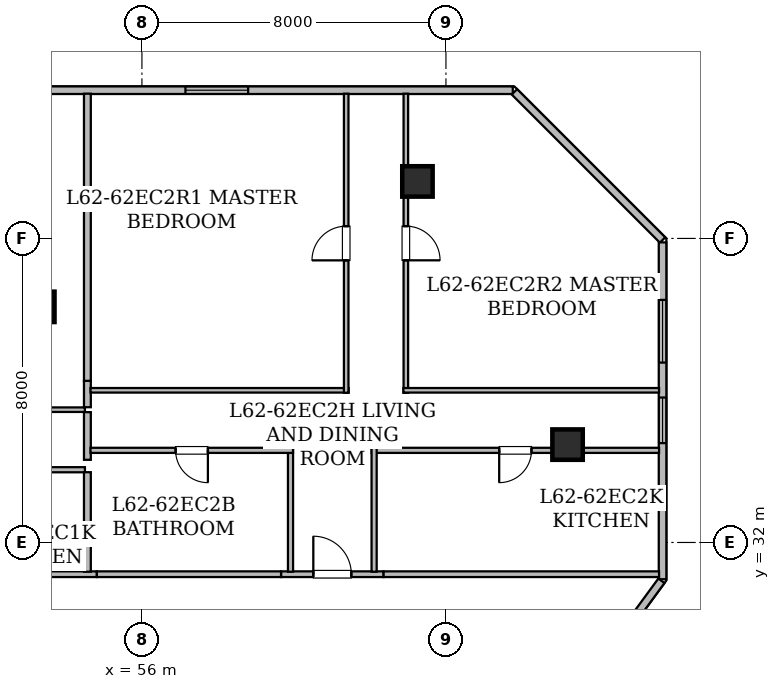
"""IFC4 building model, lengths in metres.
Left out: names, types, materials, properties, quantities, classifications, styles, units other than length and angle.
Written with IfcOpenShell. Run it as: python <this file> out.ifc"""

import sys

from ifc_helpers import new_model, si_unit, direction, frame, frame_2d, origin, origin_2d, place, context, subcontext, project, spatial, rectangle, hollow_rectangle, extrude, element, fill, save


model = new_model("IFC4")
c1 = context("Model", 3, precision=1e-05, world=origin(), true_north=direction((0.0, 1.0)))
c2 = subcontext(c1, "Body", "Model", "MODEL_VIEW")
j1 = project(units=[si_unit("LENGTHUNIT", "METRE"), si_unit("PLANEANGLEUNIT", "RADIAN")], contexts=[c1])
p1 = place(None, origin())
s1 = spatial("IfcSite", under=j1, at=p1, CompositionType="ELEMENT")
p2 = place(p1, origin())
s2 = spatial("IfcBuilding", under=s1, at=p2, CompositionType="ELEMENT")
p3 = place(p2, frame((0.0, 0.0, 242.75)))
s3 = spatial("IfcBuildingStorey", under=s2, at=p3, CompositionType="ELEMENT", Elevation=242.75)
for number, where, z_axis, x_axis in (
    (1, (63.25, 41.5, 0.0), (0.0, 0.0, 1.0), (1.0, 0.0, 0.0)),
    (2, (67.2, 34.575, 0.0), (0.0, 0.0, 1.0), (1.0, 0.0, 0.0)),
    (3, (53.3, 38.2, 0.0), (0.0, 0.0, 1.0), (1.0, 0.0, 0.0)),
):
    element("IfcColumn", number, at=place(p3, frame(where, z_axis=z_axis, x_axis=x_axis)), inside=s3, PredefinedType="COLUMN", context=c2, shape_type="SweptSolid", body=[
        extrude(hollow_rectangle(XDim=0.8, YDim=0.8, WallThickness=0.04, at=origin_2d()), origin(), (0.0, 0.0, 1.0), 3.65),
    ])
p4 = place(p3, frame((24.302, 43.9, 0.0), z_axis=(0.0, 0.0, 1.0), x_axis=(1.0, 0.0, 0.0)))
e4 = element("IfcWall", 4, at=p4, inside=s3, PredefinedType="STANDARD", context=c2, shape_type="SweptSolid", body=[
    extrude(rectangle(XDim=41.457, YDim=0.2, at=frame_2d((20.729, 0.0))), origin(), (0.0, 0.0, 1.0), 3.43),
])
p5 = place(p4, frame((5.573, 0.0, 0.85)))
e5 = element("IfcOpeningElement", 5, at=p5, cuts=e4, PredefinedType="OPENING", context=c2, shape_type="SweptSolid", body=[
    extrude(rectangle(XDim=1.65, YDim=1.55, at=frame_2d((0.825, 0.775))), frame((0.0, 0.11, 0.0), z_axis=(0.0, -1.0, 0.0), x_axis=(1.0, 0.0, 0.0)), (0.0, 0.0, 1.0), 0.22),
])
p6 = place(p4, frame((0.604, 0.0, 0.85)))
e6 = element("IfcOpeningElement", 6, at=p6, cuts=e4, PredefinedType="OPENING", context=c2, shape_type="SweptSolid", body=[
    extrude(rectangle(XDim=1.65, YDim=1.55, at=frame_2d((0.825, 0.775))), frame((0.0, 0.11, 0.0), z_axis=(0.0, -1.0, 0.0), x_axis=(1.0, 0.0, 0.0)), (0.0, 0.0, 1.0), 0.22),
])
p7 = place(p4, frame((23.188, 0.0, 0.8)))
e7 = element("IfcOpeningElement", 7, at=p7, cuts=e4, PredefinedType="OPENING", context=c2, shape_type="SweptSolid", body=[
    extrude(rectangle(XDim=1.2, YDim=1.5, at=frame_2d((0.6, 0.75))), frame((0.0, 0.11, 0.0), z_axis=(0.0, -1.0, 0.0), x_axis=(1.0, 0.0, 0.0)), (0.0, 0.0, 1.0), 0.22),
])
p8 = place(p4, frame((19.333, 0.0, 0.85)))
e8 = element("IfcOpeningElement", 8, at=p8, cuts=e4, PredefinedType="OPENING", context=c2, shape_type="SweptSolid", body=[
    extrude(rectangle(XDim=1.65, YDim=1.55, at=frame_2d((0.825, 0.775))), frame((0.0, 0.11, 0.0), z_axis=(0.0, -1.0, 0.0), x_axis=(1.0, 0.0, 0.0)), (0.0, 0.0, 1.0), 0.22),
])
p9 = place(p4, frame((26.593, 0.0, 0.85)))
e9 = element("IfcOpeningElement", 9, at=p9, cuts=e4, PredefinedType="OPENING", context=c2, shape_type="SweptSolid", body=[
    extrude(rectangle(XDim=1.65, YDim=1.55, at=frame_2d((0.825, 0.775))), frame((0.0, 0.11, 0.0), z_axis=(0.0, -1.0, 0.0), x_axis=(1.0, 0.0, 0.0)), (0.0, 0.0, 1.0), 0.22),
])
p10 = place(p4, frame((32.843, 0.0, 0.85)))
e10 = element("IfcOpeningElement", 10, at=p10, cuts=e4, PredefinedType="OPENING", context=c2, shape_type="SweptSolid", body=[
    extrude(rectangle(XDim=1.65, YDim=1.55, at=frame_2d((0.825, 0.775))), frame((0.0, 0.11, 0.0), z_axis=(0.0, -1.0, 0.0), x_axis=(1.0, 0.0, 0.0)), (0.0, 0.0, 1.0), 0.22),
])
p11 = place(p3, frame((65.802, 43.857, 0.0), z_axis=(0.0, 0.0, 1.0), x_axis=(0.707106781187, -0.707106781187, 0.0)))
e11 = element("IfcWall", 11, at=p11, inside=s3, PredefinedType="STANDARD", context=c2, shape_type="SweptSolid", body=[
    extrude(rectangle(XDim=5.512, YDim=0.2, at=frame_2d((2.756, 0.0))), origin(), (0.0, 0.0, 1.0), 3.43),
])
p12 = place(p3, frame((69.7, 39.896, 0.0), z_axis=(0.0, 0.0, 1.0), x_axis=(0.0, -1.0, 0.0)))
e12 = element("IfcWall", 12, at=p12, inside=s3, PredefinedType="STANDARD", context=c2, shape_type="SweptSolid", body=[
    extrude(rectangle(XDim=8.863, YDim=0.2, at=frame_2d((4.432, 0.0))), origin(), (0.0, 0.0, 1.0), 3.43),
])
p13 = place(p12, frame((4.082, 0.0, 0.8)))
e13 = element("IfcOpeningElement", 13, at=p13, cuts=e12, PredefinedType="OPENING", context=c2, shape_type="SweptSolid", body=[
    extrude(rectangle(XDim=1.2, YDim=1.5, at=frame_2d((0.6, 0.75))), frame((0.0, 0.11, 0.0), z_axis=(0.0, -1.0, 0.0), x_axis=(1.0, 0.0, 0.0)), (0.0, 0.0, 1.0), 0.22),
])
p14 = place(p12, frame((1.513, 0.0, 0.85)))
e14 = element("IfcOpeningElement", 14, at=p14, cuts=e12, PredefinedType="OPENING", context=c2, shape_type="SweptSolid", body=[
    extrude(rectangle(XDim=1.65, YDim=1.55, at=frame_2d((0.825, 0.775))), frame((0.0, 0.11, 0.0), z_axis=(0.0, -1.0, 0.0), x_axis=(1.0, 0.0, 0.0)), (0.0, 0.0, 1.0), 0.22),
])
p15 = place(p3, frame((69.67, 30.992, 0.0), z_axis=(0.0, 0.0, 1.0), x_axis=(-0.591320870733, -0.806436375566, 0.0)))
e15 = element("IfcWall", 15, at=p15, inside=s3, PredefinedType="STANDARD", context=c2, shape_type="SweptSolid", body=[
    extrude(rectangle(XDim=3.71, YDim=0.2, at=frame_2d((1.855, 0.0))), origin(), (0.0, 0.0, 1.0), 3.43),
])
p16 = place(p3, frame((49.439, 31.165, 0.0), z_axis=(0.0, 0.0, 1.0), x_axis=(1.0, 0.0, 0.0)))
e16 = element("IfcWall", 16, at=p16, inside=s3, PredefinedType="STANDARD", context=c2, shape_type="SweptSolid", body=[
    extrude(rectangle(XDim=5.375, YDim=0.15, at=frame_2d((2.688, 0.0))), origin(), (0.0, 0.0, 1.0), 2.725),
])
p17 = place(p3, frame((59.661, 31.165, 0.0), z_axis=(0.0, 0.0, 1.0), x_axis=(1.0, 0.0, 0.0)))
e17 = element("IfcWall", 17, at=p17, inside=s3, PredefinedType="STANDARD", context=c2, shape_type="SweptSolid", body=[
    extrude(rectangle(XDim=2.698, YDim=0.15, at=frame_2d((1.349, 0.0))), origin(), (0.0, 0.0, 1.0), 3.43),
])
p18 = place(p17, frame((0.849, 0.0, 0.0)))
e18 = element("IfcOpeningElement", 18, at=p18, cuts=e17, PredefinedType="OPENING", context=c2, shape_type="SweptSolid", body=[
    extrude(rectangle(XDim=1.0, YDim=2.15, at=frame_2d((0.5, 1.075))), frame((0.0, 0.085, 0.0), z_axis=(0.0, -1.0, 0.0), x_axis=(1.0, 0.0, 0.0)), (0.0, 0.0, 1.0), 0.17),
])
p19 = place(p3, frame((54.814, 31.165, 0.0), z_axis=(0.0, 0.0, 1.0), x_axis=(1.0, 0.0, 0.0)))
e19 = element("IfcWall", 19, at=p19, inside=s3, PredefinedType="STANDARD", context=c2, shape_type="SweptSolid", body=[
    extrude(rectangle(XDim=4.847, YDim=0.15, at=frame_2d((2.423, 0.0))), origin(), (0.0, 0.0, 1.0), 3.43),
])
p20 = place(p3, frame((62.359, 31.165, 0.0), z_axis=(0.0, 0.0, 1.0), x_axis=(1.0, 0.0, 0.0)))
e20 = element("IfcWall", 20, at=p20, inside=s3, PredefinedType="STANDARD", context=c2, shape_type="SweptSolid", body=[
    extrude(rectangle(XDim=7.249, YDim=0.15, at=frame_2d((3.625, 0.0))), origin(), (0.0, 0.0, 1.0), 2.887),
])
p21 = place(p3, frame((54.5, 33.914, 0.0), z_axis=(0.0, 0.0, 1.0), x_axis=(-1.0, 0.0, 0.0)))
e21 = element("IfcWall", 21, at=p21, inside=s3, PredefinedType="PARTITIONING", context=c2, shape_type="SweptSolid", body=[
    extrude(rectangle(XDim=5.375, YDim=0.135, at=frame_2d((2.688, 0.0))), origin(), (0.0, 0.0, 1.0), 2.725),
])
p22 = place(p21, frame((2.263, 0.0, 0.0)))
e22 = element("IfcOpeningElement", 22, at=p22, cuts=e21, PredefinedType="OPENING", context=c2, shape_type="SweptSolid", body=[
    extrude(rectangle(XDim=0.85, YDim=2.1, at=frame_2d((0.425, 1.05))), frame((0.0, 0.077, 0.0), z_axis=(0.0, -1.0, 0.0), x_axis=(1.0, 0.0, 0.0)), (0.0, 0.0, 1.0), 0.155),
])
p23 = place(p3, frame((48.81, 35.494, 0.0), z_axis=(0.0, 0.0, 1.0), x_axis=(1.0, 0.0, 0.0)))
e23 = element("IfcWall", 23, at=p23, inside=s3, PredefinedType="PARTITIONING", context=c2, shape_type="SweptSolid", body=[
    extrude(rectangle(XDim=5.69, YDim=0.12, at=frame_2d((2.845, 0.0))), origin(), (0.0, 0.0, 1.0), 2.725),
])
p24 = place(p3, frame((54.565, 35.429, 0.0), z_axis=(0.0, 0.0, 1.0), x_axis=(0.0, -1.0, 0.0)))
e24 = element("IfcWall", 24, at=p24, inside=s3, PredefinedType="STANDARD", context=c2, shape_type="SweptSolid", body=[
    extrude(rectangle(XDim=1.254, YDim=0.18, at=frame_2d((0.627, 0.0))), origin(), (0.0, 0.0, 1.0), 3.43),
])
p25 = place(p3, frame((54.565, 33.849, 0.0), z_axis=(0.0, 0.0, 1.0), x_axis=(0.0, -1.0, 0.0)))
e25 = element("IfcWall", 25, at=p25, inside=s3, PredefinedType="STANDARD", context=c2, shape_type="SweptSolid", body=[
    extrude(rectangle(XDim=2.619, YDim=0.18, at=frame_2d((1.31, 0.0))), origin(), (0.0, 0.0, 1.0), 3.107),
])
p26 = place(p3, frame((54.565, 36.253, 0.0), z_axis=(0.0, 0.0, 1.0), x_axis=(0.0, -1.0, 0.0)))
e26 = element("IfcWall", 26, at=p26, inside=s3, PredefinedType="STANDARD", context=c2, shape_type="SweptSolid", body=[
    extrude(rectangle(XDim=0.694, YDim=0.18, at=frame_2d((0.347, 0.0))), origin(), (0.0, 0.0, 1.0), 3.43),
])
p27 = place(p3, frame((54.565, 43.808, 0.0), z_axis=(0.0, 0.0, 1.0), x_axis=(0.0, -1.0, 0.0)))
e27 = element("IfcWall", 27, at=p27, inside=s3, PredefinedType="STANDARD", context=c2, shape_type="SweptSolid", body=[
    extrude(rectangle(XDim=7.555, YDim=0.18, at=frame_2d((3.778, 0.0))), origin(), (0.0, 0.0, 1.0), 2.725),
])
p28 = place(p3, frame((59.91, 31.23, 0.0), z_axis=(0.0, 0.0, 1.0), x_axis=(0.0, 1.0, 0.0)))
e28 = element("IfcWall", 28, at=p28, inside=s3, PredefinedType="PARTITIONING", context=c2, shape_type="SweptSolid", body=[
    extrude(rectangle(XDim=3.259, YDim=0.135, at=frame_2d((1.629, 0.0))), origin(), (0.0, 0.0, 1.0), 3.107),
])
p29 = place(p3, frame((59.975, 34.424, 0.0), z_axis=(0.0, 0.0, 1.0), x_axis=(-1.0, 0.0, 0.0)))
e29 = element("IfcWall", 29, at=p29, inside=s3, PredefinedType="PARTITIONING", context=c2, shape_type="SweptSolid", body=[
    extrude(rectangle(XDim=5.328, YDim=0.135, at=frame_2d((2.664, 0.0))), origin(), (0.0, 0.0, 1.0), 3.43),
])
p30 = place(p29, frame((2.239, 0.0, 0.0)))
e30 = element("IfcOpeningElement", 30, at=p30, cuts=e29, PredefinedType="OPENING", context=c2, shape_type="SweptSolid", body=[
    extrude(rectangle(XDim=0.85, YDim=2.1, at=frame_2d((0.425, 1.05))), frame((0.0, 0.077, 0.0), z_axis=(0.0, -1.0, 0.0), x_axis=(1.0, 0.0, 0.0)), (0.0, 0.0, 1.0), 0.155),
])
p31 = place(p3, frame((69.608, 34.424, 0.0), z_axis=(0.0, 0.0, 1.0), x_axis=(-1.0, 0.0, 0.0)))
e31 = element("IfcWall", 31, at=p31, inside=s3, PredefinedType="PARTITIONING", context=c2, shape_type="SweptSolid", body=[
    extrude(rectangle(XDim=7.563, YDim=0.135, at=frame_2d((3.781, 0.0))), origin(), (0.0, 0.0, 1.0), 2.725),
])
p32 = place(p31, frame((3.357, 0.0, 0.0)))
e32 = element("IfcOpeningElement", 32, at=p32, cuts=e31, PredefinedType="OPENING", context=c2, shape_type="SweptSolid", body=[
    extrude(rectangle(XDim=0.85, YDim=2.1, at=frame_2d((0.425, 1.05))), frame((0.0, 0.077, 0.0), z_axis=(0.0, -1.0, 0.0), x_axis=(1.0, 0.0, 0.0)), (0.0, 0.0, 1.0), 0.155),
])
p33 = place(p3, frame((62.11, 34.489, 0.0), z_axis=(0.0, 0.0, 1.0), x_axis=(0.0, -1.0, 0.0)))
e33 = element("IfcWall", 33, at=p33, inside=s3, PredefinedType="PARTITIONING", context=c2, shape_type="SweptSolid", body=[
    extrude(rectangle(XDim=3.259, YDim=0.135, at=frame_2d((1.629, 0.0))), origin(), (0.0, 0.0, 1.0), 3.107),
])
p34 = place(p3, frame((54.647, 36.004, 0.0), z_axis=(0.0, 0.0, 1.0), x_axis=(1.0, 0.0, 0.0)))
e34 = element("IfcWall", 34, at=p34, inside=s3, PredefinedType="PARTITIONING", context=c2, shape_type="SweptSolid", body=[
    extrude(rectangle(XDim=6.793, YDim=0.12, at=frame_2d((3.396, 0.0))), origin(), (0.0, 0.0, 1.0), 2.725),
])
p35 = place(p3, frame((61.375, 35.939, 0.0), z_axis=(0.0, 0.0, 1.0), x_axis=(0.0, 1.0, 0.0)))
e35 = element("IfcWall", 35, at=p35, inside=s3, PredefinedType="PARTITIONING", context=c2, shape_type="SweptSolid", body=[
    extrude(rectangle(XDim=7.869, YDim=0.12, at=frame_2d((3.935, 0.0))), origin(), (0.0, 0.0, 1.0), 2.725),
])
p36 = place(p35, frame((3.484, 0.0, 0.0)))
e36 = element("IfcOpeningElement", 36, at=p36, cuts=e35, PredefinedType="OPENING", context=c2, shape_type="SweptSolid", body=[
    extrude(rectangle(XDim=0.9, YDim=2.1, at=frame_2d((0.45, 1.05))), frame((0.0, 0.07, 0.0), z_axis=(0.0, -1.0, 0.0), x_axis=(1.0, 0.0, 0.0)), (0.0, 0.0, 1.0), 0.14),
])
p37 = place(p3, frame((62.945, 43.808, 0.0), z_axis=(0.0, 0.0, 1.0), x_axis=(0.0, -1.0, 0.0)))
e37 = element("IfcWall", 37, at=p37, inside=s3, PredefinedType="PARTITIONING", context=c2, shape_type="SweptSolid", body=[
    extrude(rectangle(XDim=7.869, YDim=0.12, at=frame_2d((3.935, 0.0))), origin(), (0.0, 0.0, 1.0), 2.725),
])
p38 = place(p37, frame((3.484, 0.0, 0.0)))
e38 = element("IfcOpeningElement", 38, at=p38, cuts=e37, PredefinedType="OPENING", context=c2, shape_type="SweptSolid", body=[
    extrude(rectangle(XDim=0.9, YDim=2.1, at=frame_2d((0.45, 1.05))), frame((0.0, 0.07, 0.0), z_axis=(0.0, -1.0, 0.0), x_axis=(1.0, 0.0, 0.0)), (0.0, 0.0, 1.0), 0.14),
])
p39 = place(p3, frame((62.88, 36.004, 0.0), z_axis=(0.0, 0.0, 1.0), x_axis=(1.0, 0.0, 0.0)))
e39 = element("IfcWall", 39, at=p39, inside=s3, PredefinedType="PARTITIONING", context=c2, shape_type="SweptSolid", body=[
    extrude(rectangle(XDim=6.728, YDim=0.12, at=frame_2d((3.364, 0.0))), origin(), (0.0, 0.0, 1.0), 2.725),
])
p40 = place(p13, origin())
e40 = element("IfcWindow", 40, at=p40, inside=s3, PartitioningType="SINGLE_PANEL", PredefinedType="WINDOW", context=c2, shape_type="SweptSolid", body=[
    extrude(rectangle(XDim=1.2, YDim=1.5, at=frame_2d((0.6, 0.75))), frame((0.0, 0.03, 0.0), z_axis=(0.0, -1.0, 0.0), x_axis=(1.0, 0.0, 0.0)), (0.0, 0.0, 1.0), 0.06),
])
fill(e13, e40)
p41 = place(p10, origin())
e41 = element("IfcWindow", 41, at=p41, inside=s3, PartitioningType="SINGLE_PANEL", PredefinedType="WINDOW", context=c2, shape_type="SweptSolid", body=[
    extrude(rectangle(XDim=1.65, YDim=1.55, at=frame_2d((0.825, 0.775))), frame((0.0, 0.03, 0.0), z_axis=(0.0, -1.0, 0.0), x_axis=(1.0, 0.0, 0.0)), (0.0, 0.0, 1.0), 0.06),
])
fill(e10, e41)
p42 = place(p14, origin())
e42 = element("IfcWindow", 42, at=p42, inside=s3, PartitioningType="SINGLE_PANEL", PredefinedType="WINDOW", context=c2, shape_type="SweptSolid", body=[
    extrude(rectangle(XDim=1.65, YDim=1.55, at=frame_2d((0.825, 0.775))), frame((0.0, 0.03, 0.0), z_axis=(0.0, -1.0, 0.0), x_axis=(1.0, 0.0, 0.0)), (0.0, 0.0, 1.0), 0.06),
])
fill(e14, e42)
p43 = place(p18, origin())
e43 = element("IfcDoor", 43, at=p43, inside=s3, OperationType="SINGLE_SWING_LEFT", PredefinedType="DOOR", context=c2, shape_type="SweptSolid", body=[
    extrude(rectangle(XDim=1.0, YDim=2.15, at=frame_2d((0.5, 1.075))), frame((0.0, 0.025, 0.0), z_axis=(0.0, -1.0, 0.0), x_axis=(1.0, 0.0, 0.0)), (0.0, 0.0, 1.0), 0.05),
])
fill(e18, e43)
p44 = place(p30, origin())
e44 = element("IfcDoor", 44, at=p44, inside=s3, OperationType="SINGLE_SWING_LEFT", PredefinedType="DOOR", context=c2, shape_type="SweptSolid", body=[
    extrude(rectangle(XDim=0.85, YDim=2.1, at=frame_2d((0.425, 1.05))), frame((0.0, 0.025, 0.0), z_axis=(0.0, -1.0, 0.0), x_axis=(1.0, 0.0, 0.0)), (0.0, 0.0, 1.0), 0.05),
])
fill(e30, e44)
p45 = place(p32, origin())
e45 = element("IfcDoor", 45, at=p45, inside=s3, OperationType="SINGLE_SWING_RIGHT", PredefinedType="DOOR", context=c2, shape_type="SweptSolid", body=[
    extrude(rectangle(XDim=0.85, YDim=2.1, at=frame_2d((0.425, 1.05))), frame((0.0, 0.025, 0.0), z_axis=(0.0, -1.0, 0.0), x_axis=(1.0, 0.0, 0.0)), (0.0, 0.0, 1.0), 0.05),
])
fill(e32, e45)
p46 = place(p36, origin())
e46 = element("IfcDoor", 46, at=p46, inside=s3, OperationType="SINGLE_SWING_LEFT", PredefinedType="DOOR", context=c2, shape_type="SweptSolid", body=[
    extrude(rectangle(XDim=0.9, YDim=2.1, at=frame_2d((0.45, 1.05))), frame((0.0, 0.025, 0.0), z_axis=(0.0, -1.0, 0.0), x_axis=(1.0, 0.0, 0.0)), (0.0, 0.0, 1.0), 0.05),
])
fill(e36, e46)
p47 = place(p38, origin())
e47 = element("IfcDoor", 47, at=p47, inside=s3, OperationType="SINGLE_SWING_RIGHT", PredefinedType="DOOR", context=c2, shape_type="SweptSolid", body=[
    extrude(rectangle(XDim=0.9, YDim=2.1, at=frame_2d((0.45, 1.05))), frame((0.0, 0.025, 0.0), z_axis=(0.0, -1.0, 0.0), x_axis=(1.0, 0.0, 0.0)), (0.0, 0.0, 1.0), 0.05),
])
fill(e38, e47)
save(model, sys.argv[1])
